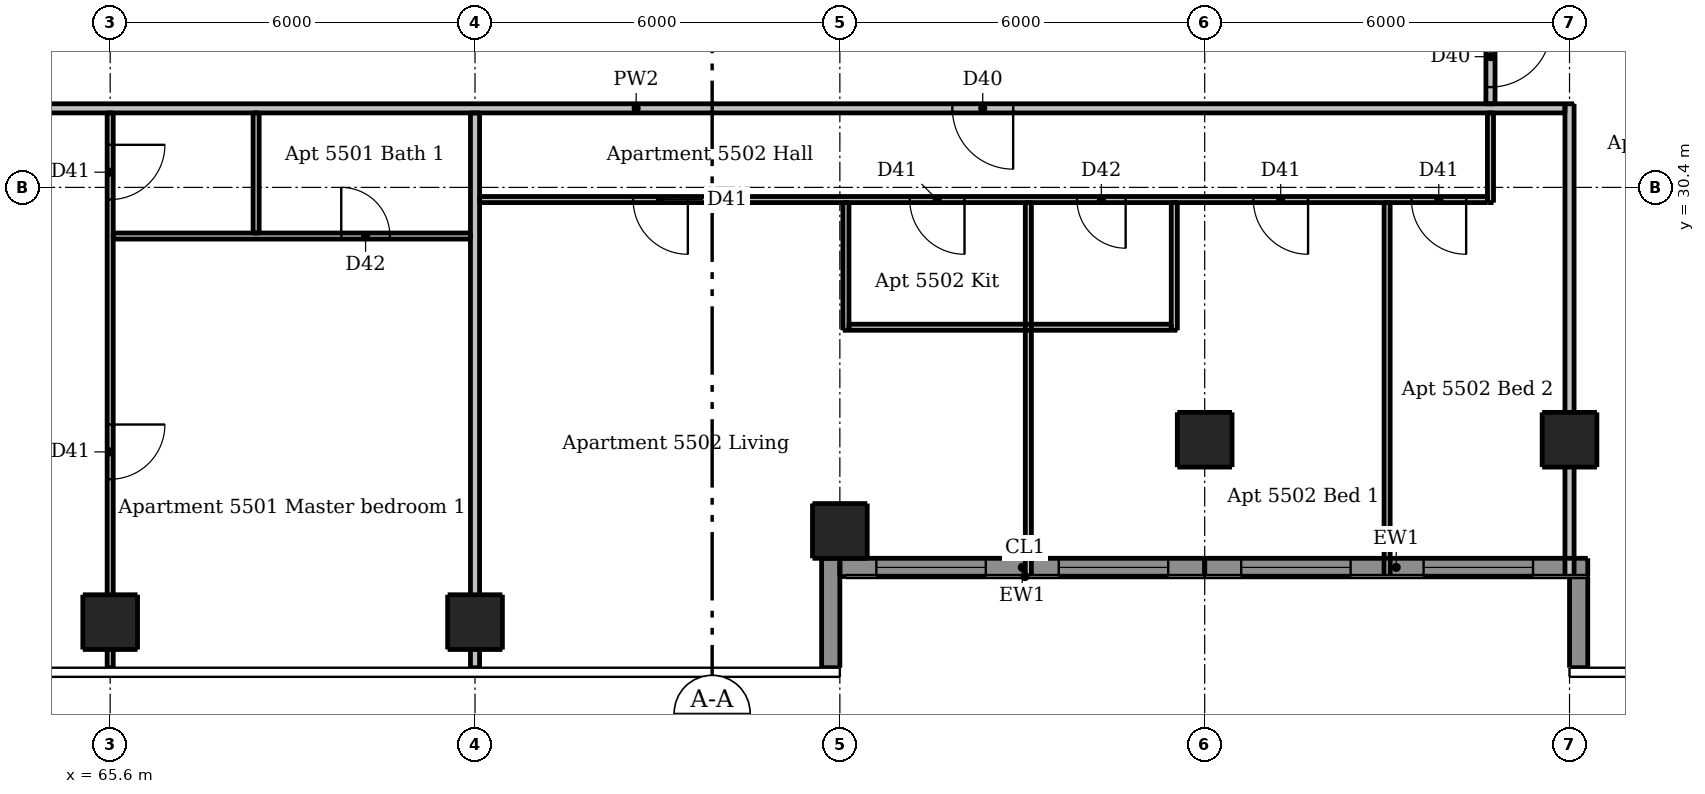
"""IFC4 building model, lengths in metres.
Left out: names, types, materials, properties, quantities, classifications, styles, units other than length and angle.
Written with IfcOpenShell. Run it as: python <this file> out.ifc"""

import sys

from ifc_helpers import new_model, si_unit, direction, frame, frame_2d, origin, origin_2d, place, context, subcontext, project, spatial, rectangle, extrude, element, fill, save


model = new_model("IFC4")
c1 = context("Model", 3, precision=1e-05, world=origin(), true_north=direction((0.0, 1.0)))
c2 = subcontext(c1, "Body", "Model", "MODEL_VIEW")
j1 = project(units=[si_unit("LENGTHUNIT", "METRE"), si_unit("PLANEANGLEUNIT", "RADIAN")], contexts=[c1])
p1 = place(None, origin())
s1 = spatial("IfcSite", under=j1, at=p1, CompositionType="ELEMENT")
p2 = place(p1, origin())
s2 = spatial("IfcBuilding", under=s1, at=p2, CompositionType="ELEMENT")
p3 = place(p2, frame((0.0, 0.0, 206.8)))
s3 = spatial("IfcBuildingStorey", under=s2, at=p3, CompositionType="ELEMENT", Elevation=206.8)
for number, where, z_axis, x_axis in (
    (1, (65.6, 23.25, 0.0), (0.0, 0.0, 1.0), (1.0, 0.0, 0.0)),
    (2, (71.6, 23.25, 0.0), (0.0, 0.0, 1.0), (1.0, 0.0, 0.0)),
    (3, (77.6, 24.75, 0.0), (0.0, 0.0, 1.0), (1.0, 0.0, 0.0)),
    (4, (83.6, 26.25, 0.0), (0.0, 0.0, 1.0), (1.0, 0.0, 0.0)),
    (5, (89.6, 26.25, 0.0), (0.0, 0.0, 1.0), (1.0, 0.0, 0.0)),
):
    element("IfcColumn", number, at=place(p3, frame(where, z_axis=z_axis, x_axis=x_axis)), inside=s3, PredefinedType="COLUMN", context=c2, shape_type="SweptSolid", body=[
        extrude(rectangle(XDim=0.9, YDim=0.9, at=origin_2d()), origin(), (0.0, 0.0, 1.0), 3.05),
    ])
p4 = place(p3, frame((77.45, 22.5, 0.0), z_axis=(0.0, 0.0, 1.0), x_axis=(0.0, 1.0, 0.0)))
e6 = element("IfcWall", 6, at=p4, inside=s3, PredefinedType="SOLIDWALL", context=c2, shape_type="SweptSolid", body=[
    extrude(rectangle(XDim=1.8, YDim=0.3, at=frame_2d((0.9, 0.0))), origin(), (0.0, 0.0, 1.0), 3.05),
])
p5 = place(p3, frame((89.75, 24.0, 0.0), z_axis=(0.0, 0.0, 1.0), x_axis=(0.0, -1.0, 0.0)))
e7 = element("IfcWall", 7, at=p5, inside=s3, PredefinedType="SOLIDWALL", context=c2, shape_type="SweptSolid", body=[
    extrude(rectangle(XDim=1.5, YDim=0.3, at=frame_2d((0.75, 0.0))), origin(), (0.0, 0.0, 1.0), 3.05),
])
p6 = place(p3, frame((77.6, 24.15, 0.0), z_axis=(0.0, 0.0, 1.0), x_axis=(1.0, 0.0, 0.0)))
e8 = element("IfcWall", 8, at=p6, inside=s3, PredefinedType="SOLIDWALL", context=c2, shape_type="SweptSolid", body=[
    extrude(rectangle(XDim=6.0, YDim=0.3, at=frame_2d((3.0, 0.0))), origin(), (0.0, 0.0, 1.0), 3.05),
])
p7 = place(p6, frame((0.6, 0.0, 0.15)))
e9 = element("IfcOpeningElement", 9, at=p7, cuts=e8, PredefinedType="OPENING", context=c2, shape_type="SweptSolid", body=[
    extrude(rectangle(XDim=1.8, YDim=2.1, at=frame_2d((0.9, 1.05))), frame((0.0, 0.16, 0.0), z_axis=(0.0, -1.0, 0.0), x_axis=(1.0, 0.0, 0.0)), (0.0, 0.0, 1.0), 0.32),
])
p8 = place(p6, frame((3.6, 0.0, 0.15)))
e10 = element("IfcOpeningElement", 10, at=p8, cuts=e8, PredefinedType="OPENING", context=c2, shape_type="SweptSolid", body=[
    extrude(rectangle(XDim=1.8, YDim=2.1, at=frame_2d((0.9, 1.05))), frame((0.0, 0.16, 0.0), z_axis=(0.0, -1.0, 0.0), x_axis=(1.0, 0.0, 0.0)), (0.0, 0.0, 1.0), 0.32),
])
p9 = place(p3, frame((83.6, 24.15, 0.0), z_axis=(0.0, 0.0, 1.0), x_axis=(1.0, 0.0, 0.0)))
e11 = element("IfcWall", 11, at=p9, inside=s3, PredefinedType="SOLIDWALL", context=c2, shape_type="SweptSolid", body=[
    extrude(rectangle(XDim=6.3, YDim=0.3, at=frame_2d((3.15, 0.0))), origin(), (0.0, 0.0, 1.0), 3.05),
])
p10 = place(p9, frame((0.6, 0.0, 0.15)))
e12 = element("IfcOpeningElement", 12, at=p10, cuts=e11, PredefinedType="OPENING", context=c2, shape_type="SweptSolid", body=[
    extrude(rectangle(XDim=1.8, YDim=2.1, at=frame_2d((0.9, 1.05))), frame((0.0, 0.16, 0.0), z_axis=(0.0, -1.0, 0.0), x_axis=(1.0, 0.0, 0.0)), (0.0, 0.0, 1.0), 0.32),
])
p11 = place(p9, frame((3.6, 0.0, 0.15)))
e13 = element("IfcOpeningElement", 13, at=p11, cuts=e11, PredefinedType="OPENING", context=c2, shape_type="SweptSolid", body=[
    extrude(rectangle(XDim=1.8, YDim=2.1, at=frame_2d((0.9, 1.05))), frame((0.0, 0.16, 0.0), z_axis=(0.0, -1.0, 0.0), x_axis=(1.0, 0.0, 0.0)), (0.0, 0.0, 1.0), 0.32),
])
p12 = place(p3, frame((65.6, 31.625, 0.0), z_axis=(0.0, 0.0, 1.0), x_axis=(0.0, -1.0, 0.0)))
e14 = element("IfcWall", 14, at=p12, inside=s3, PredefinedType="PARTITIONING", context=c2, shape_type="SweptSolid", body=[
    extrude(rectangle(XDim=9.125, YDim=0.1, at=frame_2d((4.562, 0.0))), origin(), (0.0, 0.0, 1.0), 2.516),
])
p13 = place(p12, frame((0.525, 0.0, 0.0)))
e15 = element("IfcOpeningElement", 15, at=p13, cuts=e14, PredefinedType="OPENING", context=c2, shape_type="SweptSolid", body=[
    extrude(rectangle(XDim=0.9, YDim=2.1, at=frame_2d((0.45, 1.05))), frame((0.0, 0.06, 0.0), z_axis=(0.0, -1.0, 0.0), x_axis=(1.0, 0.0, 0.0)), (0.0, 0.0, 1.0), 0.12),
])
p14 = place(p12, frame((5.125, 0.0, 0.0)))
e16 = element("IfcOpeningElement", 16, at=p14, cuts=e14, PredefinedType="OPENING", context=c2, shape_type="SweptSolid", body=[
    extrude(rectangle(XDim=0.9, YDim=2.1, at=frame_2d((0.45, 1.05))), frame((0.0, 0.06, 0.0), z_axis=(0.0, -1.0, 0.0), x_axis=(1.0, 0.0, 0.0)), (0.0, 0.0, 1.0), 0.12),
])
p15 = place(p3, frame((68.0, 29.65, 0.0), z_axis=(0.0, 0.0, 1.0), x_axis=(0.0, 1.0, 0.0)))
e17 = element("IfcWall", 17, at=p15, inside=s3, PredefinedType="PARTITIONING", context=c2, shape_type="SweptSolid", body=[
    extrude(rectangle(XDim=1.975, YDim=0.1, at=frame_2d((0.988, 0.0))), origin(), (0.0, 0.0, 1.0), 3.05),
])
p16 = place(p3, frame((77.7, 28.05, 0.0), z_axis=(0.0, 0.0, 1.0), x_axis=(0.0, 1.0, 0.0)))
e18 = element("IfcWall", 18, at=p16, inside=s3, PredefinedType="PARTITIONING", context=c2, shape_type="SweptSolid", body=[
    extrude(rectangle(XDim=2.1, YDim=0.1, at=frame_2d((1.05, 0.0))), origin(), (0.0, 0.0, 1.0), 2.59),
])
p17 = place(p3, frame((80.7, 24.0, 0.0), z_axis=(0.0, 0.0, 1.0), x_axis=(0.0, 1.0, 0.0)))
e19 = element("IfcWall", 19, at=p17, inside=s3, PredefinedType="PARTITIONING", context=c2, shape_type="SweptSolid", body=[
    extrude(rectangle(XDim=6.15, YDim=0.1, at=frame_2d((3.075, 0.0))), origin(), (0.0, 0.0, 1.0), 3.05),
])
p18 = place(p3, frame((83.1, 28.05, 0.0), z_axis=(0.0, 0.0, 1.0), x_axis=(0.0, 1.0, 0.0)))
e20 = element("IfcWall", 20, at=p18, inside=s3, PredefinedType="PARTITIONING", context=c2, shape_type="SweptSolid", body=[
    extrude(rectangle(XDim=2.1, YDim=0.1, at=frame_2d((1.05, 0.0))), origin(), (0.0, 0.0, 1.0), 3.05),
])
p19 = place(p3, frame((86.6, 24.0, 0.0), z_axis=(0.0, 0.0, 1.0), x_axis=(0.0, 1.0, 0.0)))
e21 = element("IfcWall", 21, at=p19, inside=s3, PredefinedType="PARTITIONING", context=c2, shape_type="SweptSolid", body=[
    extrude(rectangle(XDim=6.15, YDim=0.1, at=frame_2d((3.075, 0.0))), origin(), (0.0, 0.0, 1.0), 3.05),
])
p20 = place(p3, frame((88.3, 30.15, 0.0), z_axis=(0.0, 0.0, 1.0), x_axis=(0.0, 1.0, 0.0)))
e22 = element("IfcWall", 22, at=p20, inside=s3, PredefinedType="PARTITIONING", context=c2, shape_type="SweptSolid", body=[
    extrude(rectangle(XDim=1.475, YDim=0.1, at=frame_2d((0.738, 0.0))), origin(), (0.0, 0.0, 1.0), 3.05),
])
p21 = place(p3, frame((88.25, 30.2, 0.0), z_axis=(0.0, 0.0, 1.0), x_axis=(-1.0, 0.0, 0.0)))
e23 = element("IfcWall", 23, at=p21, inside=s3, PredefinedType="PARTITIONING", context=c2, shape_type="SweptSolid", body=[
    extrude(rectangle(XDim=16.575, YDim=0.1, at=frame_2d((8.288, 0.0))), origin(), (0.0, 0.0, 1.0), 3.05),
])
p22 = place(p21, frame((13.15, 0.0, 0.0)))
e24 = element("IfcOpeningElement", 24, at=p22, cuts=e23, PredefinedType="OPENING", context=c2, shape_type="SweptSolid", body=[
    extrude(rectangle(XDim=0.9, YDim=2.1, at=frame_2d((0.45, 1.05))), frame((0.0, 0.06, 0.0), z_axis=(0.0, -1.0, 0.0), x_axis=(1.0, 0.0, 0.0)), (0.0, 0.0, 1.0), 0.12),
])
p23 = place(p21, frame((8.6, 0.0, 0.0)))
e25 = element("IfcOpeningElement", 25, at=p23, cuts=e23, PredefinedType="OPENING", context=c2, shape_type="SweptSolid", body=[
    extrude(rectangle(XDim=0.9, YDim=2.1, at=frame_2d((0.45, 1.05))), frame((0.0, 0.06, 0.0), z_axis=(0.0, -1.0, 0.0), x_axis=(1.0, 0.0, 0.0)), (0.0, 0.0, 1.0), 0.12),
])
p24 = place(p21, frame((2.95, 0.0, 0.0)))
e26 = element("IfcOpeningElement", 26, at=p24, cuts=e23, PredefinedType="OPENING", context=c2, shape_type="SweptSolid", body=[
    extrude(rectangle(XDim=0.9, YDim=2.1, at=frame_2d((0.45, 1.05))), frame((0.0, 0.06, 0.0), z_axis=(0.0, -1.0, 0.0), x_axis=(1.0, 0.0, 0.0)), (0.0, 0.0, 1.0), 0.12),
])
p25 = place(p21, frame((0.35, 0.0, 0.0)))
e27 = element("IfcOpeningElement", 27, at=p25, cuts=e23, PredefinedType="OPENING", context=c2, shape_type="SweptSolid", body=[
    extrude(rectangle(XDim=0.9, YDim=2.1, at=frame_2d((0.45, 1.05))), frame((0.0, 0.06, 0.0), z_axis=(0.0, -1.0, 0.0), x_axis=(1.0, 0.0, 0.0)), (0.0, 0.0, 1.0), 0.12),
])
p26 = place(p21, frame((5.95, 0.0, 0.0)))
e28 = element("IfcOpeningElement", 28, at=p26, cuts=e23, PredefinedType="OPENING", context=c2, shape_type="SweptSolid", body=[
    extrude(rectangle(XDim=0.8, YDim=2.1, at=frame_2d((0.4, 1.05))), frame((0.0, 0.06, 0.0), z_axis=(0.0, -1.0, 0.0), x_axis=(1.0, 0.0, 0.0)), (0.0, 0.0, 1.0), 0.12),
])
p27 = place(p3, frame((65.65, 29.6, 0.0), z_axis=(0.0, 0.0, 1.0), x_axis=(1.0, 0.0, 0.0)))
e29 = element("IfcWall", 29, at=p27, inside=s3, PredefinedType="PARTITIONING", context=c2, shape_type="SweptSolid", body=[
    extrude(rectangle(XDim=5.875, YDim=0.1, at=frame_2d((2.938, 0.0))), origin(), (0.0, 0.0, 1.0), 3.05),
])
p28 = place(p27, frame((3.75, 0.0, 0.0)))
e30 = element("IfcOpeningElement", 30, at=p28, cuts=e29, PredefinedType="OPENING", context=c2, shape_type="SweptSolid", body=[
    extrude(rectangle(XDim=0.8, YDim=2.1, at=frame_2d((0.4, 1.05))), frame((0.0, 0.06, 0.0), z_axis=(0.0, -1.0, 0.0), x_axis=(1.0, 0.0, 0.0)), (0.0, 0.0, 1.0), 0.12),
])
p29 = place(p3, frame((77.75, 28.1, 0.0), z_axis=(0.0, 0.0, 1.0), x_axis=(1.0, 0.0, 0.0)))
e31 = element("IfcWall", 31, at=p29, inside=s3, PredefinedType="PARTITIONING", context=c2, shape_type="SweptSolid", body=[
    extrude(rectangle(XDim=5.3, YDim=0.1, at=frame_2d((2.65, 0.0))), origin(), (0.0, 0.0, 1.0), 3.05),
])
p30 = place(p3, frame((71.6, 22.5, 0.0), z_axis=(0.0, 0.0, 1.0), x_axis=(0.0, 1.0, 0.0)))
e32 = element("IfcWall", 32, at=p30, inside=s3, PredefinedType="PARTITIONING", context=c2, shape_type="SweptSolid", body=[
    extrude(rectangle(XDim=9.125, YDim=0.15, at=frame_2d((4.562, 0.0))), origin(), (0.0, 0.0, 1.0), 2.516),
])
p31 = place(p3, frame((88.3, 61.175, 0.0), z_axis=(0.0, 0.0, 1.0), x_axis=(0.0, -1.0, 0.0)))
e33 = element("IfcWall", 33, at=p31, inside=s3, PredefinedType="PARTITIONING", context=c2, shape_type="SweptSolid", body=[
    extrude(rectangle(XDim=29.4, YDim=0.15, at=frame_2d((14.7, 0.0))), origin(), (0.0, 0.0, 1.0), 3.05),
])
p32 = place(p31, frame((28.125, 0.0, 0.0)))
e34 = element("IfcOpeningElement", 34, at=p32, cuts=e33, PredefinedType="OPENING", context=c2, shape_type="SweptSolid", body=[
    extrude(rectangle(XDim=1.0, YDim=2.1, at=frame_2d((0.5, 1.05))), frame((0.0, 0.085, 0.0), z_axis=(0.0, -1.0, 0.0), x_axis=(1.0, 0.0, 0.0)), (0.0, 0.0, 1.0), 0.17),
])
p33 = place(p31, frame((10.775, 0.0, 0.0)))
e35 = element("IfcOpeningElement", 35, at=p33, cuts=e33, PredefinedType="OPENING", context=c2, shape_type="SweptSolid", body=[
    extrude(rectangle(XDim=1.0, YDim=2.1, at=frame_2d((0.5, 1.05))), frame((0.0, 0.085, 0.0), z_axis=(0.0, -1.0, 0.0), x_axis=(1.0, 0.0, 0.0)), (0.0, 0.0, 1.0), 0.17),
])
p34 = place(p3, frame((89.6, 24.0, 0.0), z_axis=(0.0, 0.0, 1.0), x_axis=(0.0, 1.0, 0.0)))
e36 = element("IfcWall", 36, at=p34, inside=s3, PredefinedType="PARTITIONING", context=c2, shape_type="SweptSolid", body=[
    extrude(rectangle(XDim=7.775, YDim=0.15, at=frame_2d((3.887, 0.0))), origin(), (0.0, 0.0, 1.0), 2.516),
])
p35 = place(p3, frame((89.525, 31.7, 0.0), z_axis=(0.0, 0.0, 1.0), x_axis=(-1.0, 0.0, 0.0)))
e37 = element("IfcWall", 37, at=p35, inside=s3, PredefinedType="PARTITIONING", context=c2, shape_type="SweptSolid", body=[
    extrude(rectangle(XDim=30.55, YDim=0.15, at=frame_2d((15.275, 0.0))), origin(), (0.0, 0.0, 1.0), 3.05),
])
p36 = place(p35, frame((26.775, 0.0, 0.0)))
e38 = element("IfcOpeningElement", 38, at=p36, cuts=e37, PredefinedType="OPENING", context=c2, shape_type="SweptSolid", body=[
    extrude(rectangle(XDim=1.0, YDim=2.1, at=frame_2d((0.5, 1.05))), frame((0.0, 0.085, 0.0), z_axis=(0.0, -1.0, 0.0), x_axis=(1.0, 0.0, 0.0)), (0.0, 0.0, 1.0), 0.17),
])
p37 = place(p35, frame((9.075, 0.0, 0.0)))
e39 = element("IfcOpeningElement", 39, at=p37, cuts=e37, PredefinedType="OPENING", context=c2, shape_type="SweptSolid", body=[
    extrude(rectangle(XDim=1.0, YDim=2.1, at=frame_2d((0.5, 1.05))), frame((0.0, 0.085, 0.0), z_axis=(0.0, -1.0, 0.0), x_axis=(1.0, 0.0, 0.0)), (0.0, 0.0, 1.0), 0.17),
])
p38 = place(p7, origin())
e40 = element("IfcWindow", 40, at=p38, inside=s3, PartitioningType="DOUBLE_PANEL_VERTICAL", PredefinedType="WINDOW", context=c2, shape_type="SweptSolid", body=[
    extrude(rectangle(XDim=1.8, YDim=2.1, at=frame_2d((0.9, 1.05))), frame((0.0, 0.03, 0.0), z_axis=(0.0, -1.0, 0.0), x_axis=(1.0, 0.0, 0.0)), (0.0, 0.0, 1.0), 0.06),
])
fill(e9, e40)
p39 = place(p8, origin())
e41 = element("IfcWindow", 41, at=p39, inside=s3, PartitioningType="DOUBLE_PANEL_VERTICAL", PredefinedType="WINDOW", context=c2, shape_type="SweptSolid", body=[
    extrude(rectangle(XDim=1.8, YDim=2.1, at=frame_2d((0.9, 1.05))), frame((0.0, 0.03, 0.0), z_axis=(0.0, -1.0, 0.0), x_axis=(1.0, 0.0, 0.0)), (0.0, 0.0, 1.0), 0.06),
])
fill(e10, e41)
p40 = place(p10, origin())
e42 = element("IfcWindow", 42, at=p40, inside=s3, PartitioningType="DOUBLE_PANEL_VERTICAL", PredefinedType="WINDOW", context=c2, shape_type="SweptSolid", body=[
    extrude(rectangle(XDim=1.8, YDim=2.1, at=frame_2d((0.9, 1.05))), frame((0.0, 0.03, 0.0), z_axis=(0.0, -1.0, 0.0), x_axis=(1.0, 0.0, 0.0)), (0.0, 0.0, 1.0), 0.06),
])
fill(e12, e42)
p41 = place(p11, origin())
e43 = element("IfcWindow", 43, at=p41, inside=s3, PartitioningType="DOUBLE_PANEL_VERTICAL", PredefinedType="WINDOW", context=c2, shape_type="SweptSolid", body=[
    extrude(rectangle(XDim=1.8, YDim=2.1, at=frame_2d((0.9, 1.05))), frame((0.0, 0.03, 0.0), z_axis=(0.0, -1.0, 0.0), x_axis=(1.0, 0.0, 0.0)), (0.0, 0.0, 1.0), 0.06),
])
fill(e13, e43)
p42 = place(p13, origin())
e44 = element("IfcDoor", 44, at=p42, inside=s3, OperationType="SINGLE_SWING_LEFT", PredefinedType="DOOR", context=c2, shape_type="SweptSolid", body=[
    extrude(rectangle(XDim=0.9, YDim=2.1, at=frame_2d((0.45, 1.05))), frame((0.0, 0.025, 0.0), z_axis=(0.0, -1.0, 0.0), x_axis=(1.0, 0.0, 0.0)), (0.0, 0.0, 1.0), 0.05),
])
fill(e15, e44)
p43 = place(p14, origin())
e45 = element("IfcDoor", 45, at=p43, inside=s3, OperationType="SINGLE_SWING_LEFT", PredefinedType="DOOR", context=c2, shape_type="SweptSolid", body=[
    extrude(rectangle(XDim=0.9, YDim=2.1, at=frame_2d((0.45, 1.05))), frame((0.0, 0.025, 0.0), z_axis=(0.0, -1.0, 0.0), x_axis=(1.0, 0.0, 0.0)), (0.0, 0.0, 1.0), 0.05),
])
fill(e16, e45)
p44 = place(p28, origin())
e46 = element("IfcDoor", 46, at=p44, inside=s3, OperationType="SINGLE_SWING_LEFT", PredefinedType="DOOR", context=c2, shape_type="SweptSolid", body=[
    extrude(rectangle(XDim=0.8, YDim=2.1, at=frame_2d((0.4, 1.05))), frame((0.0, 0.025, 0.0), z_axis=(0.0, -1.0, 0.0), x_axis=(1.0, 0.0, 0.0)), (0.0, 0.0, 1.0), 0.05),
])
fill(e30, e46)
p45 = place(p37, origin())
e47 = element("IfcDoor", 47, at=p45, inside=s3, OperationType="SINGLE_SWING_LEFT", PredefinedType="DOOR", context=c2, shape_type="SweptSolid", body=[
    extrude(rectangle(XDim=1.0, YDim=2.1, at=frame_2d((0.5, 1.05))), frame((0.0, 0.025, 0.0), z_axis=(0.0, -1.0, 0.0), x_axis=(1.0, 0.0, 0.0)), (0.0, 0.0, 1.0), 0.05),
])
fill(e39, e47)
p46 = place(p22, origin())
e48 = element("IfcDoor", 48, at=p46, inside=s3, OperationType="SINGLE_SWING_LEFT", PredefinedType="DOOR", context=c2, shape_type="SweptSolid", body=[
    extrude(rectangle(XDim=0.9, YDim=2.1, at=frame_2d((0.45, 1.05))), frame((0.0, 0.025, 0.0), z_axis=(0.0, -1.0, 0.0), x_axis=(1.0, 0.0, 0.0)), (0.0, 0.0, 1.0), 0.05),
])
fill(e24, e48)
p47 = place(p23, origin())
e49 = element("IfcDoor", 49, at=p47, inside=s3, OperationType="SINGLE_SWING_LEFT", PredefinedType="DOOR", context=c2, shape_type="SweptSolid", body=[
    extrude(rectangle(XDim=0.9, YDim=2.1, at=frame_2d((0.45, 1.05))), frame((0.0, 0.025, 0.0), z_axis=(0.0, -1.0, 0.0), x_axis=(1.0, 0.0, 0.0)), (0.0, 0.0, 1.0), 0.05),
])
fill(e25, e49)
p48 = place(p24, origin())
e50 = element("IfcDoor", 50, at=p48, inside=s3, OperationType="SINGLE_SWING_LEFT", PredefinedType="DOOR", context=c2, shape_type="SweptSolid", body=[
    extrude(rectangle(XDim=0.9, YDim=2.1, at=frame_2d((0.45, 1.05))), frame((0.0, 0.025, 0.0), z_axis=(0.0, -1.0, 0.0), x_axis=(1.0, 0.0, 0.0)), (0.0, 0.0, 1.0), 0.05),
])
fill(e26, e50)
p49 = place(p25, origin())
e51 = element("IfcDoor", 51, at=p49, inside=s3, OperationType="SINGLE_SWING_LEFT", PredefinedType="DOOR", context=c2, shape_type="SweptSolid", body=[
    extrude(rectangle(XDim=0.9, YDim=2.1, at=frame_2d((0.45, 1.05))), frame((0.0, 0.025, 0.0), z_axis=(0.0, -1.0, 0.0), x_axis=(1.0, 0.0, 0.0)), (0.0, 0.0, 1.0), 0.05),
])
fill(e27, e51)
p50 = place(p26, origin())
e52 = element("IfcDoor", 52, at=p50, inside=s3, OperationType="SINGLE_SWING_LEFT", PredefinedType="DOOR", context=c2, shape_type="SweptSolid", body=[
    extrude(rectangle(XDim=0.8, YDim=2.1, at=frame_2d((0.4, 1.05))), frame((0.0, 0.025, 0.0), z_axis=(0.0, -1.0, 0.0), x_axis=(1.0, 0.0, 0.0)), (0.0, 0.0, 1.0), 0.05),
])
fill(e28, e52)
p51 = place(p32, origin())
e53 = element("IfcDoor", 53, at=p51, inside=s3, OperationType="SINGLE_SWING_LEFT", PredefinedType="DOOR", context=c2, shape_type="SweptSolid", body=[
    extrude(rectangle(XDim=1.0, YDim=2.1, at=frame_2d((0.5, 1.05))), frame((0.0, 0.025, 0.0), z_axis=(0.0, -1.0, 0.0), x_axis=(1.0, 0.0, 0.0)), (0.0, 0.0, 1.0), 0.05),
])
fill(e34, e53)
save(model, sys.argv[1])
